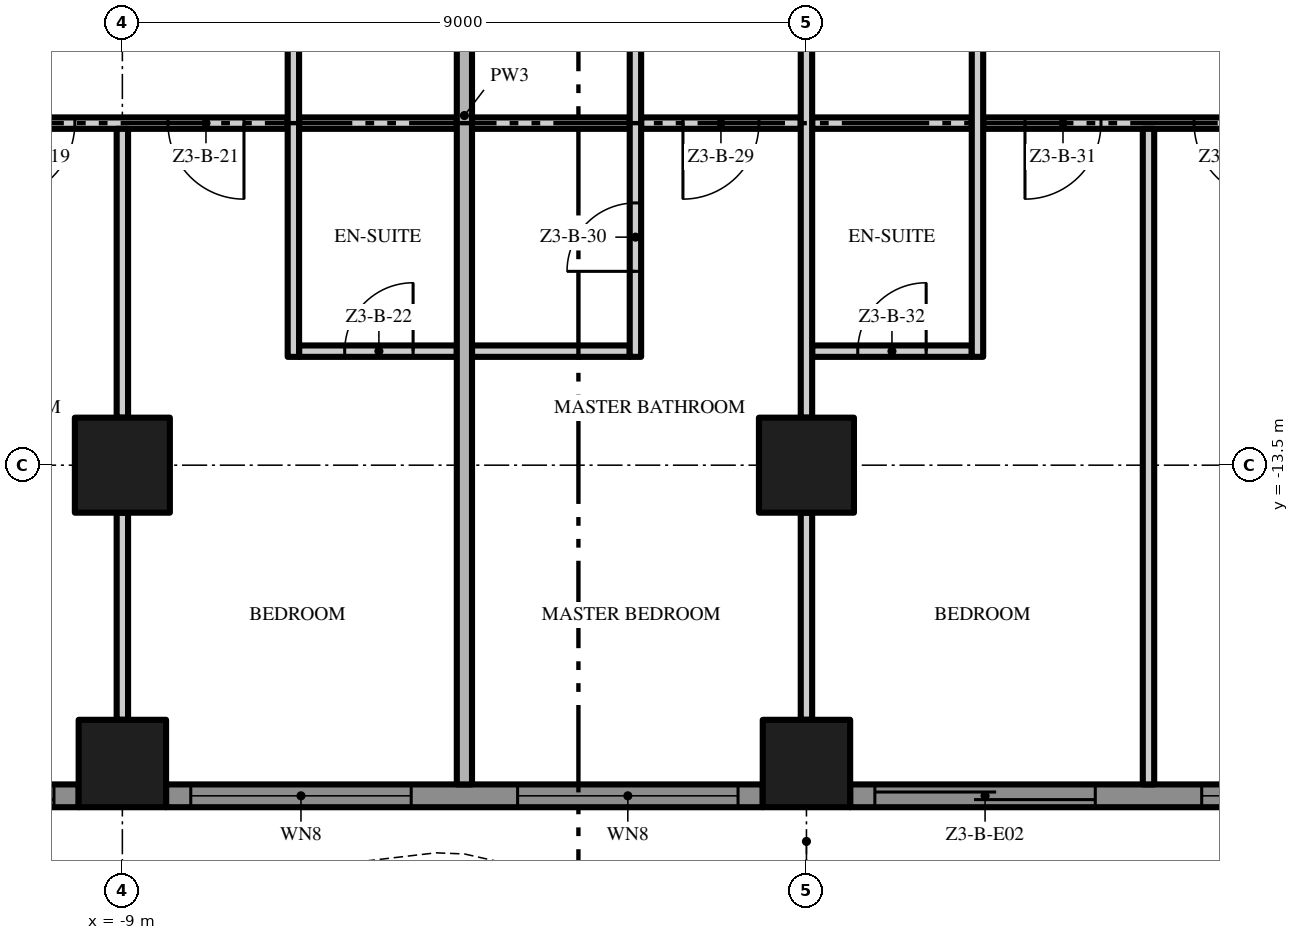
"""IFC4 building model, lengths in metres.
Left out: names, types, materials, properties, quantities, classifications, styles, units other than length and angle.
Written with IfcOpenShell. Run it as: python <this file> out.ifc"""

import sys

from ifc_helpers import new_model, si_unit, direction, frame, frame_2d, origin, origin_2d, place, context, subcontext, project, spatial, polyline, rectangle, outline, extrude, element, fill, save


model = new_model("IFC4")
c1 = context("Model", 3, precision=1e-05, world=origin(), true_north=direction((0.0, 1.0)))
c2 = subcontext(c1, "Body", "Model", "MODEL_VIEW")
j1 = project(units=[si_unit("LENGTHUNIT", "METRE"), si_unit("PLANEANGLEUNIT", "RADIAN")], contexts=[c1])
p1 = place(None, origin())
s1 = spatial("IfcSite", under=j1, at=p1, CompositionType="ELEMENT")
p2 = place(p1, origin())
s2 = spatial("IfcBuilding", under=s1, at=p2, CompositionType="ELEMENT")
p3 = place(p2, frame((0.0, 0.0, 140.2)))
s3 = spatial("IfcBuildingStorey", under=s2, at=p3, CompositionType="ELEMENT", Elevation=140.2)
p4 = place(p3, frame((-9.0, -13.5, 0.0), z_axis=(0.0, 0.0, 1.0), x_axis=(1.0, 0.0, 0.0)))
e1 = element("IfcColumn", 1, at=p4, inside=s3, PredefinedType="COLUMN", context=c2, shape_type="SweptSolid", body=[
    extrude(rectangle(XDim=1.25, YDim=1.25, at=origin_2d()), origin(), (0.0, 0.0, 1.0), 3.5),
])
p5 = place(p3, frame((-9.0, -17.425, 0.0), z_axis=(0.0, 0.0, 1.0), x_axis=(1.0, 0.0, 0.0)))
e2 = element("IfcColumn", 2, at=p5, inside=s3, PredefinedType="COLUMN", context=c2, shape_type="SweptSolid", body=[
    extrude(rectangle(XDim=1.15, YDim=1.15, at=origin_2d()), origin(), (0.0, 0.0, 1.0), 3.5),
])
p6 = place(p3, frame((0.0, -13.5, 0.0), z_axis=(0.0, 0.0, 1.0), x_axis=(1.0, 0.0, 0.0)))
e3 = element("IfcColumn", 3, at=p6, inside=s3, PredefinedType="COLUMN", context=c2, shape_type="SweptSolid", body=[
    extrude(rectangle(XDim=1.25, YDim=1.25, at=origin_2d()), origin(), (0.0, 0.0, 1.0), 3.5),
])
p7 = place(p3, frame((0.0, -17.425, 0.0), z_axis=(0.0, 0.0, 1.0), x_axis=(1.0, 0.0, 0.0)))
e4 = element("IfcColumn", 4, at=p7, inside=s3, PredefinedType="COLUMN", context=c2, shape_type="SweptSolid", body=[
    extrude(rectangle(XDim=1.15, YDim=1.15, at=origin_2d()), origin(), (0.0, 0.0, 1.0), 3.5),
])
p8 = place(p3, frame((-9.575, -17.85, 0.0), z_axis=(0.0, 0.0, 1.0), x_axis=(-1.0, 0.0, 0.0)))
e5 = element("IfcWall", 5, at=p8, inside=s3, PredefinedType="SOLIDWALL", context=c2, shape_type="SweptSolid", body=[
    extrude(rectangle(XDim=7.275, YDim=0.3, at=frame_2d((3.638, 0.0))), origin(), (0.0, 0.0, 1.0), 3.5),
])
p9 = place(p8, frame((4.625, 0.0, 0.45)))
e6 = element("IfcOpeningElement", 6, at=p9, cuts=e5, PredefinedType="OPENING", context=c2, shape_type="SweptSolid", body=[
    extrude(rectangle(XDim=2.35, YDim=2.65, at=frame_2d((1.175, 1.325))), frame((0.0, 0.16, 0.0), z_axis=(0.0, -1.0, 0.0), x_axis=(1.0, 0.0, 0.0)), (0.0, 0.0, 1.0), 0.32),
])
p10 = place(p8, frame((0.325, 0.0, 0.0)))
e7 = element("IfcOpeningElement", 7, at=p10, cuts=e5, PredefinedType="OPENING", context=c2, shape_type="SweptSolid", body=[
    extrude(rectangle(XDim=2.9, YDim=2.4, at=frame_2d((1.45, 1.2))), frame((0.0, 0.16, 0.0), z_axis=(0.0, -1.0, 0.0), x_axis=(1.0, 0.0, 0.0)), (0.0, 0.0, 1.0), 0.32),
])
p11 = place(p3, frame((-0.575, -17.85, 0.0), z_axis=(0.0, 0.0, 1.0), x_axis=(-1.0, 0.0, 0.0)))
e8 = element("IfcWall", 8, at=p11, inside=s3, PredefinedType="SOLIDWALL", context=c2, shape_type="SweptSolid", body=[
    extrude(rectangle(XDim=7.85, YDim=0.3, at=frame_2d((3.925, 0.0))), origin(), (0.0, 0.0, 1.0), 3.5),
])
p12 = place(p11, frame((4.625, 0.0, 0.45)))
e9 = element("IfcOpeningElement", 9, at=p12, cuts=e8, PredefinedType="OPENING", context=c2, shape_type="SweptSolid", body=[
    extrude(rectangle(XDim=2.9, YDim=2.65, at=frame_2d((1.45, 1.325))), frame((0.0, 0.16, 0.0), z_axis=(0.0, -1.0, 0.0), x_axis=(1.0, 0.0, 0.0)), (0.0, 0.0, 1.0), 0.32),
])
p13 = place(p11, frame((0.325, 0.0, 0.45)))
e10 = element("IfcOpeningElement", 10, at=p13, cuts=e8, PredefinedType="OPENING", context=c2, shape_type="SweptSolid", body=[
    extrude(rectangle(XDim=2.9, YDim=2.65, at=frame_2d((1.45, 1.325))), frame((0.0, 0.16, 0.0), z_axis=(0.0, -1.0, 0.0), x_axis=(1.0, 0.0, 0.0)), (0.0, 0.0, 1.0), 0.32),
])
p14 = place(p3, frame((8.425, -17.85, 0.0), z_axis=(0.0, 0.0, 1.0), x_axis=(-1.0, 0.0, 0.0)))
e11 = element("IfcWall", 11, at=p14, inside=s3, PredefinedType="SOLIDWALL", context=c2, shape_type="SweptSolid", body=[
    extrude(rectangle(XDim=7.85, YDim=0.3, at=frame_2d((3.925, 0.0))), origin(), (0.0, 0.0, 1.0), 3.5),
])
p15 = place(p14, frame((4.625, 0.0, 0.0)))
e12 = element("IfcOpeningElement", 12, at=p15, cuts=e11, PredefinedType="OPENING", context=c2, shape_type="SweptSolid", body=[
    extrude(rectangle(XDim=2.9, YDim=2.4, at=frame_2d((1.45, 1.2))), frame((0.0, 0.16, 0.0), z_axis=(0.0, -1.0, 0.0), x_axis=(1.0, 0.0, 0.0)), (0.0, 0.0, 1.0), 0.32),
])
p16 = place(p14, frame((0.325, 0.0, 0.45)))
e13 = element("IfcOpeningElement", 13, at=p16, cuts=e11, PredefinedType="OPENING", context=c2, shape_type="SweptSolid", body=[
    extrude(rectangle(XDim=2.9, YDim=2.65, at=frame_2d((1.45, 1.325))), frame((0.0, 0.16, 0.0), z_axis=(0.0, -1.0, 0.0), x_axis=(1.0, 0.0, 0.0)), (0.0, 0.0, 1.0), 0.32),
])
p17 = place(p3, origin())
e14 = element("IfcWall", 14, at=p17, inside=s3, PredefinedType="USERDEFINED", context=c2, shape_type="SweptSolid", body=[
    extrude(outline(polyline([(-18.0, -18.951), (-16.5, -19.612), (-15.0, -20.345), (-13.5, -20.869), (-12.375, -21.0), (-12.0, -20.985), (-10.5, -20.649), (-9.0, -19.988), (-7.5, -19.255), (-6.0, -18.731), (-4.875, -18.6), (-4.5, -18.615), (-3.0, -18.951), (-1.5, -19.612), (0.0, -20.345), (1.5, -20.869), (2.625, -21.0), (3.0, -20.985), (4.5, -20.649), (6.0, -19.988), (7.5, -19.255), (9.0, -18.731), (10.125, -18.6), (10.5, -18.615), (12.0, -18.951), (13.5, -19.612), (15.0, -20.345), (16.5, -20.869), (17.625, -21.0), (18.0, -20.985), (17.99, -20.735), (17.635, -20.749), (16.556, -20.624), (15.096, -20.114), (13.605, -19.385), (12.079, -18.713), (10.533, -18.366), (10.115, -18.349), (8.944, -18.486), (7.404, -19.024), (5.895, -19.761), (4.421, -20.41), (2.967, -20.736), (2.635, -20.749), (1.556, -20.624), (0.096, -20.114), (-1.395, -19.385), (-2.921, -18.713), (-4.467, -18.366), (-4.885, -18.349), (-6.056, -18.486), (-7.596, -19.024), (-9.105, -19.761), (-10.579, -20.41), (-12.033, -20.736), (-12.365, -20.749), (-13.444, -20.624), (-14.904, -20.114), (-16.395, -19.385), (-17.899, -18.723), (-18.0, -18.951)])), origin(), (0.0, 0.0, 1.0), 0.9),
])
p18 = place(p3, frame((-6.675, -12.0, 0.0), z_axis=(0.0, 0.0, 1.0), x_axis=(1.0, 0.0, 0.0)))
e15 = element("IfcWall", 15, at=p18, inside=s3, PredefinedType="PARTITIONING", context=c2, shape_type="SweptSolid", body=[
    extrude(rectangle(XDim=2.075, YDim=0.15, at=frame_2d((1.038, 0.0))), origin(), (0.0, 0.0, 1.0), 3.5),
])
p19 = place(p18, frame((0.6, 0.0, 0.0)))
e16 = element("IfcOpeningElement", 16, at=p19, cuts=e15, PredefinedType="OPENING", context=c2, shape_type="SweptSolid", body=[
    extrude(rectangle(XDim=0.9, YDim=2.1, at=frame_2d((0.45, 1.05))), frame((0.0, 0.085, 0.0), z_axis=(0.0, -1.0, 0.0), x_axis=(1.0, 0.0, 0.0)), (0.0, 0.0, 1.0), 0.17),
])
p20 = place(p3, frame((-4.4, -12.0, 0.0), z_axis=(0.0, 0.0, 1.0), x_axis=(1.0, 0.0, 0.0)))
e17 = element("IfcWall", 17, at=p20, inside=s3, PredefinedType="PARTITIONING", context=c2, shape_type="SweptSolid", body=[
    extrude(rectangle(XDim=2.075, YDim=0.15, at=frame_2d((1.038, 0.0))), origin(), (0.0, 0.0, 1.0), 3.5),
])
p21 = place(p3, frame((0.075, -12.0, 0.0), z_axis=(0.0, 0.0, 1.0), x_axis=(1.0, 0.0, 0.0)))
e18 = element("IfcWall", 18, at=p21, inside=s3, PredefinedType="PARTITIONING", context=c2, shape_type="SweptSolid", body=[
    extrude(rectangle(XDim=2.1, YDim=0.15, at=frame_2d((1.05, 0.0))), origin(), (0.0, 0.0, 1.0), 3.5),
])
p22 = place(p21, frame((0.6, 0.0, 0.0)))
e19 = element("IfcOpeningElement", 19, at=p22, cuts=e18, PredefinedType="OPENING", context=c2, shape_type="SweptSolid", body=[
    extrude(rectangle(XDim=0.9, YDim=2.1, at=frame_2d((0.45, 1.05))), frame((0.0, 0.085, 0.0), z_axis=(0.0, -1.0, 0.0), x_axis=(1.0, 0.0, 0.0)), (0.0, 0.0, 1.0), 0.17),
])
p23 = place(p3, frame((-6.825, -9.0, 0.0), z_axis=(0.0, 0.0, 1.0), x_axis=(-1.0, 0.0, 0.0)))
e20 = element("IfcWall", 20, at=p23, inside=s3, PredefinedType="PARTITIONING", context=c2, shape_type="SweptSolid", body=[
    extrude(rectangle(XDim=4.35, YDim=0.15, at=frame_2d((2.175, 0.0))), origin(), (0.0, 0.0, 1.0), 3.5),
])
p24 = place(p23, frame((2.8, 0.0, 0.0)))
e21 = element("IfcOpeningElement", 21, at=p24, cuts=e20, PredefinedType="OPENING", context=c2, shape_type="SweptSolid", body=[
    extrude(rectangle(XDim=1.0, YDim=2.4, at=frame_2d((0.5, 1.2))), frame((0.0, 0.085, 0.0), z_axis=(0.0, -1.0, 0.0), x_axis=(1.0, 0.0, 0.0)), (0.0, 0.0, 1.0), 0.17),
])
p25 = place(p23, frame((0.575, 0.0, 0.0)))
e22 = element("IfcOpeningElement", 22, at=p25, cuts=e20, PredefinedType="OPENING", context=c2, shape_type="SweptSolid", body=[
    extrude(rectangle(XDim=1.0, YDim=2.4, at=frame_2d((0.5, 1.2))), frame((0.0, 0.085, 0.0), z_axis=(0.0, -1.0, 0.0), x_axis=(1.0, 0.0, 0.0)), (0.0, 0.0, 1.0), 0.17),
])
for number, where, z_axis, x_axis in (
    (23, (-6.675, -9.0, 0.0), (0.0, 0.0, 1.0), (1.0, 0.0, 0.0)),
    (24, (-4.4, -9.0, 0.0), (0.0, 0.0, 1.0), (1.0, 0.0, 0.0)),
):
    element("IfcWall", number, at=place(p3, frame(where, z_axis=z_axis, x_axis=x_axis)), inside=s3, PredefinedType="PARTITIONING", context=c2, shape_type="SweptSolid", body=[
        extrude(rectangle(XDim=2.075, YDim=0.15, at=frame_2d((1.038, 0.0))), origin(), (0.0, 0.0, 1.0), 3.5),
    ])
p26 = place(p3, frame((-0.075, -9.0, 0.0), z_axis=(0.0, 0.0, 1.0), x_axis=(-1.0, 0.0, 0.0)))
e25 = element("IfcWall", 25, at=p26, inside=s3, PredefinedType="PARTITIONING", context=c2, shape_type="SweptSolid", body=[
    extrude(rectangle(XDim=2.1, YDim=0.15, at=frame_2d((1.05, 0.0))), origin(), (0.0, 0.0, 1.0), 3.5),
])
p27 = place(p26, frame((0.55, 0.0, 0.0)))
e26 = element("IfcOpeningElement", 26, at=p27, cuts=e25, PredefinedType="OPENING", context=c2, shape_type="SweptSolid", body=[
    extrude(rectangle(XDim=1.0, YDim=2.4, at=frame_2d((0.5, 1.2))), frame((0.0, 0.085, 0.0), z_axis=(0.0, -1.0, 0.0), x_axis=(1.0, 0.0, 0.0)), (0.0, 0.0, 1.0), 0.17),
])
p28 = place(p3, frame((0.075, -9.0, 0.0), z_axis=(0.0, 0.0, 1.0), x_axis=(1.0, 0.0, 0.0)))
e27 = element("IfcWall", 27, at=p28, inside=s3, PredefinedType="PARTITIONING", context=c2, shape_type="SweptSolid", body=[
    extrude(rectangle(XDim=2.1, YDim=0.15, at=frame_2d((1.05, 0.0))), origin(), (0.0, 0.0, 1.0), 3.5),
])
p29 = place(p3, frame((6.675, -9.0, 0.0), z_axis=(0.0, 0.0, 1.0), x_axis=(-1.0, 0.0, 0.0)))
e28 = element("IfcWall", 28, at=p29, inside=s3, PredefinedType="PARTITIONING", context=c2, shape_type="SweptSolid", body=[
    extrude(rectangle(XDim=4.35, YDim=0.15, at=frame_2d((2.175, 0.0))), origin(), (0.0, 0.0, 1.0), 3.5),
])
p30 = place(p29, frame((2.8, 0.0, 0.0)))
e29 = element("IfcOpeningElement", 29, at=p30, cuts=e28, PredefinedType="OPENING", context=c2, shape_type="SweptSolid", body=[
    extrude(rectangle(XDim=1.0, YDim=2.4, at=frame_2d((0.5, 1.2))), frame((0.0, 0.085, 0.0), z_axis=(0.0, -1.0, 0.0), x_axis=(1.0, 0.0, 0.0)), (0.0, 0.0, 1.0), 0.17),
])
p31 = place(p29, frame((0.575, 0.0, 0.0)))
e30 = element("IfcOpeningElement", 30, at=p31, cuts=e28, PredefinedType="OPENING", context=c2, shape_type="SweptSolid", body=[
    extrude(rectangle(XDim=1.0, YDim=2.4, at=frame_2d((0.5, 1.2))), frame((0.0, 0.085, 0.0), z_axis=(0.0, -1.0, 0.0), x_axis=(1.0, 0.0, 0.0)), (0.0, 0.0, 1.0), 0.17),
])
p32 = place(p3, frame((-9.0, -16.85, 0.0), z_axis=(0.0, 0.0, 1.0), x_axis=(0.0, 1.0, 0.0)))
e31 = element("IfcWall", 31, at=p32, inside=s3, PredefinedType="PARTITIONING", context=c2, shape_type="SweptSolid", body=[
    extrude(rectangle(XDim=2.725, YDim=0.15, at=frame_2d((1.363, 0.0))), origin(), (0.0, 0.0, 1.0), 3.5),
])
p33 = place(p3, frame((-9.0, -12.875, 0.0), z_axis=(0.0, 0.0, 1.0), x_axis=(0.0, 1.0, 0.0)))
e32 = element("IfcWall", 32, at=p33, inside=s3, PredefinedType="PARTITIONING", context=c2, shape_type="SweptSolid", body=[
    extrude(rectangle(XDim=3.8, YDim=0.15, at=frame_2d((1.9, 0.0))), origin(), (0.0, 0.0, 1.0), 3.5),
])
p34 = place(p3, frame((-6.75, -12.075, 0.0), z_axis=(0.0, 0.0, 1.0), x_axis=(0.0, 1.0, 0.0)))
e33 = element("IfcWall", 33, at=p34, inside=s3, PredefinedType="PARTITIONING", context=c2, shape_type="SweptSolid", body=[
    extrude(rectangle(XDim=7.65, YDim=0.15, at=frame_2d((3.825, 0.0))), origin(), (0.0, 0.0, 1.0), 3.5),
])
p35 = place(p3, frame((-4.5, -17.7, 0.0), z_axis=(0.0, 0.0, 1.0), x_axis=(0.0, 1.0, 0.0)))
e34 = element("IfcWall", 34, at=p35, inside=s3, PredefinedType="PARTITIONING", context=c2, shape_type="SweptSolid", body=[
    extrude(rectangle(XDim=17.6, YDim=0.2, at=frame_2d((8.8, 0.0))), origin(), (0.0, 0.0, 1.0), 3.5),
])
p36 = place(p3, frame((-2.25, -12.075, 0.0), z_axis=(0.0, 0.0, 1.0), x_axis=(0.0, 1.0, 0.0)))
e35 = element("IfcWall", 35, at=p36, inside=s3, PredefinedType="PARTITIONING", context=c2, shape_type="SweptSolid", body=[
    extrude(rectangle(XDim=7.65, YDim=0.15, at=frame_2d((3.825, 0.0))), origin(), (0.0, 0.0, 1.0), 3.5),
])
p37 = place(p36, frame((4.875, 0.0, 0.0)))
e36 = element("IfcOpeningElement", 36, at=p37, cuts=e35, PredefinedType="OPENING", context=c2, shape_type="SweptSolid", body=[
    extrude(rectangle(XDim=0.9, YDim=2.1, at=frame_2d((0.45, 1.05))), frame((0.0, 0.085, 0.0), z_axis=(0.0, -1.0, 0.0), x_axis=(1.0, 0.0, 0.0)), (0.0, 0.0, 1.0), 0.17),
])
p38 = place(p36, frame((1.125, 0.0, 0.0)))
e37 = element("IfcOpeningElement", 37, at=p38, cuts=e35, PredefinedType="OPENING", context=c2, shape_type="SweptSolid", body=[
    extrude(rectangle(XDim=0.9, YDim=2.1, at=frame_2d((0.45, 1.05))), frame((0.0, 0.085, 0.0), z_axis=(0.0, -1.0, 0.0), x_axis=(1.0, 0.0, 0.0)), (0.0, 0.0, 1.0), 0.17),
])
p39 = place(p3, frame((0.0, -16.85, 0.0), z_axis=(0.0, 0.0, 1.0), x_axis=(0.0, 1.0, 0.0)))
e38 = element("IfcWall", 38, at=p39, inside=s3, PredefinedType="PARTITIONING", context=c2, shape_type="SweptSolid", body=[
    extrude(rectangle(XDim=2.725, YDim=0.15, at=frame_2d((1.363, 0.0))), origin(), (0.0, 0.0, 1.0), 3.5),
])
p40 = place(p3, frame((0.0, -12.875, 0.0), z_axis=(0.0, 0.0, 1.0), x_axis=(0.0, 1.0, 0.0)))
e39 = element("IfcWall", 39, at=p40, inside=s3, PredefinedType="PARTITIONING", context=c2, shape_type="SweptSolid", body=[
    extrude(rectangle(XDim=7.75, YDim=0.15, at=frame_2d((3.875, 0.0))), origin(), (0.0, 0.0, 1.0), 3.5),
])
p41 = place(p3, frame((2.25, -12.075, 0.0), z_axis=(0.0, 0.0, 1.0), x_axis=(0.0, 1.0, 0.0)))
e40 = element("IfcWall", 40, at=p41, inside=s3, PredefinedType="PARTITIONING", context=c2, shape_type="SweptSolid", body=[
    extrude(rectangle(XDim=7.65, YDim=0.15, at=frame_2d((3.825, 0.0))), origin(), (0.0, 0.0, 1.0), 3.5),
])
p42 = place(p3, frame((4.5, -17.7, 0.0), z_axis=(0.0, 0.0, 1.0), x_axis=(0.0, 1.0, 0.0)))
e41 = element("IfcWall", 41, at=p42, inside=s3, PredefinedType="PARTITIONING", context=c2, shape_type="SweptSolid", body=[
    extrude(rectangle(XDim=8.625, YDim=0.15, at=frame_2d((4.312, 0.0))), origin(), (0.0, 0.0, 1.0), 3.5),
])
p43 = place(p10, origin())
e42 = element("IfcDoor", 42, at=p43, inside=s3, OperationType="SINGLE_SWING_LEFT", PredefinedType="DOOR", context=c2, shape_type="SweptSolid", body=[
    extrude(rectangle(XDim=2.9, YDim=2.4, at=frame_2d((1.45, 1.2))), frame((0.0, 0.025, 0.0), z_axis=(0.0, -1.0, 0.0), x_axis=(1.0, 0.0, 0.0)), (0.0, 0.0, 1.0), 0.05),
])
fill(e7, e42)
p44 = place(p12, origin())
e43 = element("IfcWindow", 43, at=p44, inside=s3, PartitioningType="SINGLE_PANEL", PredefinedType="WINDOW", context=c2, shape_type="SweptSolid", body=[
    extrude(rectangle(XDim=2.9, YDim=2.65, at=frame_2d((1.45, 1.325))), frame((0.0, 0.03, 0.0), z_axis=(0.0, -1.0, 0.0), x_axis=(1.0, 0.0, 0.0)), (0.0, 0.0, 1.0), 0.06),
])
fill(e9, e43)
p45 = place(p13, origin())
e44 = element("IfcWindow", 44, at=p45, inside=s3, PartitioningType="SINGLE_PANEL", PredefinedType="WINDOW", context=c2, shape_type="SweptSolid", body=[
    extrude(rectangle(XDim=2.9, YDim=2.65, at=frame_2d((1.45, 1.325))), frame((0.0, 0.03, 0.0), z_axis=(0.0, -1.0, 0.0), x_axis=(1.0, 0.0, 0.0)), (0.0, 0.0, 1.0), 0.06),
])
fill(e10, e44)
p46 = place(p15, origin())
e45 = element("IfcDoor", 45, at=p46, inside=s3, OperationType="SINGLE_SWING_LEFT", PredefinedType="DOOR", context=c2, shape_type="SweptSolid", body=[
    extrude(rectangle(XDim=2.9, YDim=2.4, at=frame_2d((1.45, 1.2))), frame((0.0, 0.025, 0.0), z_axis=(0.0, -1.0, 0.0), x_axis=(1.0, 0.0, 0.0)), (0.0, 0.0, 1.0), 0.05),
])
fill(e12, e45)
p47 = place(p16, origin())
e46 = element("IfcWindow", 46, at=p47, inside=s3, PartitioningType="SINGLE_PANEL", PredefinedType="WINDOW", context=c2, shape_type="SweptSolid", body=[
    extrude(rectangle(XDim=2.9, YDim=2.65, at=frame_2d((1.45, 1.325))), frame((0.0, 0.03, 0.0), z_axis=(0.0, -1.0, 0.0), x_axis=(1.0, 0.0, 0.0)), (0.0, 0.0, 1.0), 0.06),
])
fill(e13, e46)
p48 = place(p24, origin())
e47 = element("IfcDoor", 47, at=p48, inside=s3, OperationType="SINGLE_SWING_RIGHT", PredefinedType="DOOR", context=c2, shape_type="SweptSolid", body=[
    extrude(rectangle(XDim=1.0, YDim=2.4, at=frame_2d((0.5, 1.2))), frame((0.0, 0.025, 0.0), z_axis=(0.0, -1.0, 0.0), x_axis=(1.0, 0.0, 0.0)), (0.0, 0.0, 1.0), 0.05),
])
fill(e21, e47)
p49 = place(p25, origin())
e48 = element("IfcDoor", 48, at=p49, inside=s3, OperationType="SINGLE_SWING_LEFT", PredefinedType="DOOR", context=c2, shape_type="SweptSolid", body=[
    extrude(rectangle(XDim=1.0, YDim=2.4, at=frame_2d((0.5, 1.2))), frame((0.0, 0.025, 0.0), z_axis=(0.0, -1.0, 0.0), x_axis=(1.0, 0.0, 0.0)), (0.0, 0.0, 1.0), 0.05),
])
fill(e22, e48)
p50 = place(p19, origin())
e49 = element("IfcDoor", 49, at=p50, inside=s3, OperationType="SINGLE_SWING_RIGHT", PredefinedType="DOOR", context=c2, shape_type="SweptSolid", body=[
    extrude(rectangle(XDim=0.9, YDim=2.1, at=frame_2d((0.45, 1.05))), frame((0.0, 0.025, 0.0), z_axis=(0.0, -1.0, 0.0), x_axis=(1.0, 0.0, 0.0)), (0.0, 0.0, 1.0), 0.05),
])
fill(e16, e49)
p51 = place(p27, origin())
e50 = element("IfcDoor", 50, at=p51, inside=s3, OperationType="SINGLE_SWING_RIGHT", PredefinedType="DOOR", context=c2, shape_type="SweptSolid", body=[
    extrude(rectangle(XDim=1.0, YDim=2.4, at=frame_2d((0.5, 1.2))), frame((0.0, 0.025, 0.0), z_axis=(0.0, -1.0, 0.0), x_axis=(1.0, 0.0, 0.0)), (0.0, 0.0, 1.0), 0.05),
])
fill(e26, e50)
p52 = place(p38, origin())
e51 = element("IfcDoor", 51, at=p52, inside=s3, OperationType="SINGLE_SWING_LEFT", PredefinedType="DOOR", context=c2, shape_type="SweptSolid", body=[
    extrude(rectangle(XDim=0.9, YDim=2.1, at=frame_2d((0.45, 1.05))), frame((0.0, 0.025, 0.0), z_axis=(0.0, -1.0, 0.0), x_axis=(1.0, 0.0, 0.0)), (0.0, 0.0, 1.0), 0.05),
])
fill(e37, e51)
p53 = place(p30, origin())
e52 = element("IfcDoor", 52, at=p53, inside=s3, OperationType="SINGLE_SWING_RIGHT", PredefinedType="DOOR", context=c2, shape_type="SweptSolid", body=[
    extrude(rectangle(XDim=1.0, YDim=2.4, at=frame_2d((0.5, 1.2))), frame((0.0, 0.025, 0.0), z_axis=(0.0, -1.0, 0.0), x_axis=(1.0, 0.0, 0.0)), (0.0, 0.0, 1.0), 0.05),
])
fill(e29, e52)
p54 = place(p22, origin())
e53 = element("IfcDoor", 53, at=p54, inside=s3, OperationType="SINGLE_SWING_RIGHT", PredefinedType="DOOR", context=c2, shape_type="SweptSolid", body=[
    extrude(rectangle(XDim=0.9, YDim=2.1, at=frame_2d((0.45, 1.05))), frame((0.0, 0.025, 0.0), z_axis=(0.0, -1.0, 0.0), x_axis=(1.0, 0.0, 0.0)), (0.0, 0.0, 1.0), 0.05),
])
fill(e19, e53)
p55 = place(p31, origin())
e54 = element("IfcDoor", 54, at=p55, inside=s3, OperationType="SINGLE_SWING_LEFT", PredefinedType="DOOR", context=c2, shape_type="SweptSolid", body=[
    extrude(rectangle(XDim=1.0, YDim=2.4, at=frame_2d((0.5, 1.2))), frame((0.0, 0.025, 0.0), z_axis=(0.0, -1.0, 0.0), x_axis=(1.0, 0.0, 0.0)), (0.0, 0.0, 1.0), 0.05),
])
fill(e30, e54)
save(model, sys.argv[1])
